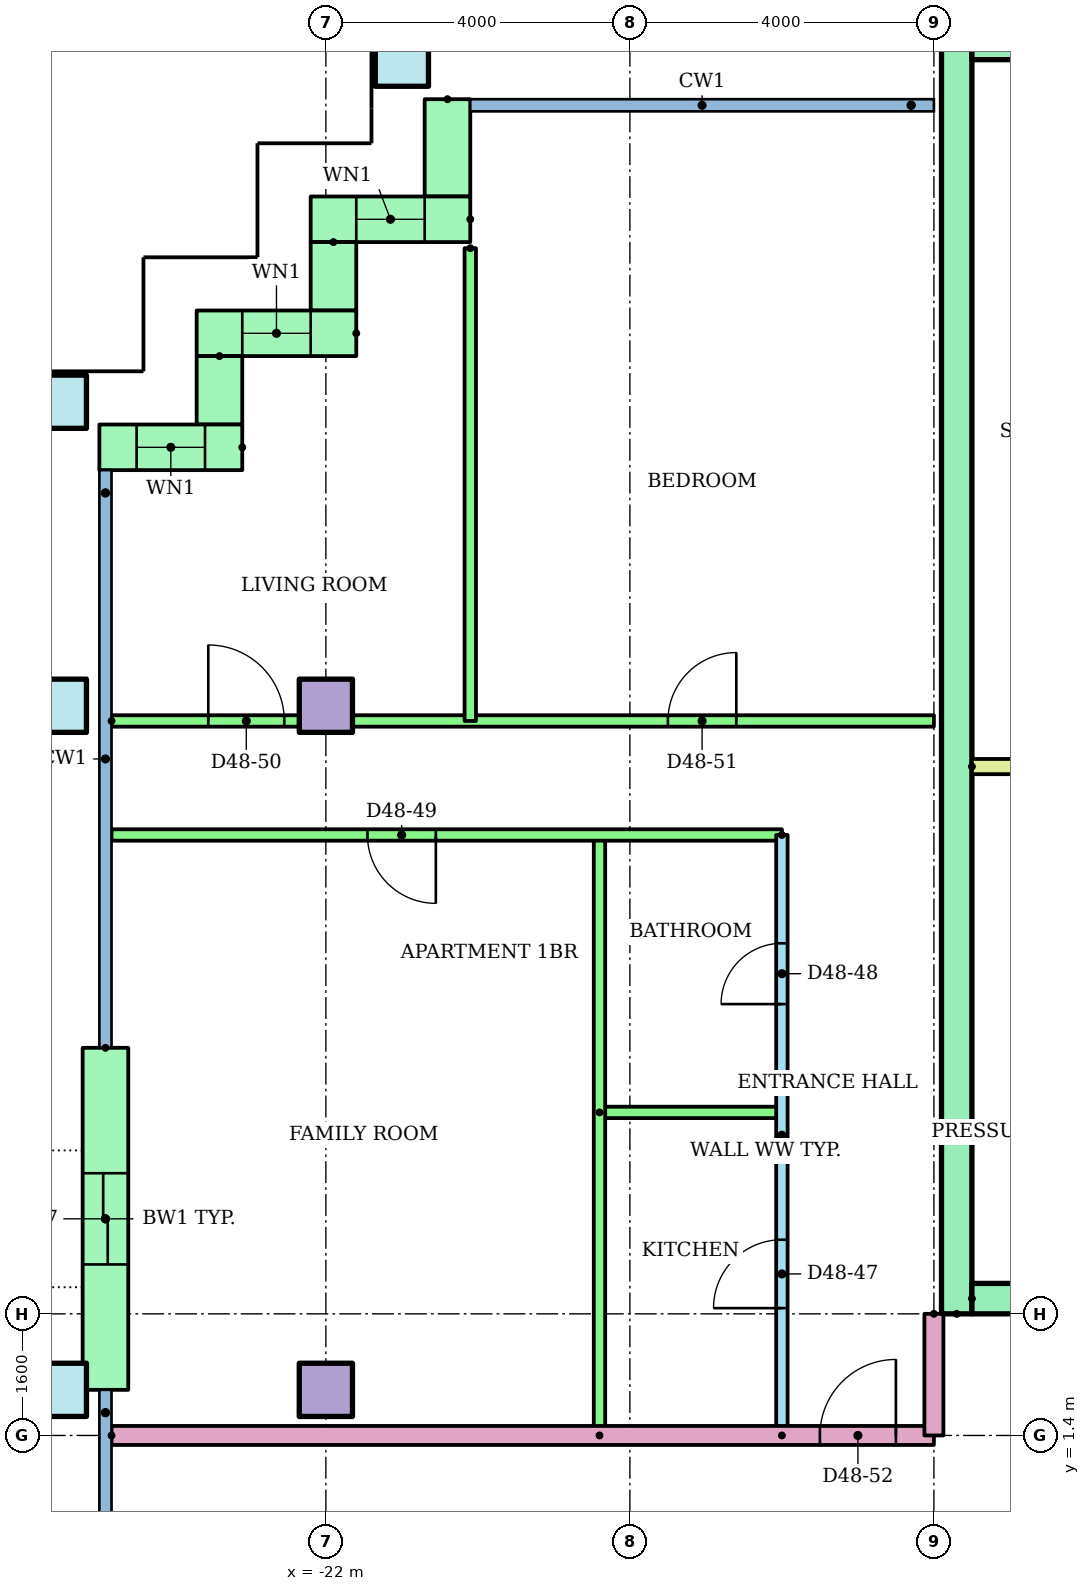
"""IFC4 building model, lengths in metres.
Left out: names, types, materials, properties, quantities, classifications, styles, units other than length and angle.
Written with IfcOpenShell. Run it as: python <this file> out.ifc"""

import sys

from ifc_helpers import new_model, si_unit, direction, frame, frame_2d, origin, origin_2d, place, context, subcontext, project, spatial, rectangle, hollow_rectangle, extrude, element, fill, save


model = new_model("IFC4")
c1 = context("Model", 3, precision=1e-05, world=origin(), true_north=direction((0.0, 1.0)))
c2 = subcontext(c1, "Body", "Model", "MODEL_VIEW")
j1 = project(units=[si_unit("LENGTHUNIT", "METRE"), si_unit("PLANEANGLEUNIT", "RADIAN")], contexts=[c1])
p1 = place(None, origin())
s1 = spatial("IfcSite", under=j1, at=p1, CompositionType="ELEMENT")
p2 = place(p1, origin())
s2 = spatial("IfcBuilding", under=s1, at=p2, CompositionType="ELEMENT")
p3 = place(p2, frame((0.0, 0.0, 184.5)))
s3 = spatial("IfcBuildingStorey", under=s2, at=p3, CompositionType="ELEMENT", Elevation=184.5)
p4 = place(p3, frame((-25.5, 2.0, 0.0)))
e1 = element("IfcColumn", 1, at=p4, inside=s3, PredefinedType="COLUMN", context=c2, shape_type="SweptSolid", body=[
    extrude(hollow_rectangle(XDim=0.7, YDim=0.7, WallThickness=0.036, at=origin_2d()), origin(), (0.0, 0.0, 1.0), 3.2),
])
p5 = place(p3, frame((-22.0, 2.0, 0.0)))
e2 = element("IfcColumn", 2, at=p5, inside=s3, PredefinedType="COLUMN", context=c2, shape_type="SweptSolid", body=[
    extrude(rectangle(XDim=0.7, YDim=0.7, at=origin_2d()), origin(), (0.0, 0.0, 1.0), 3.2),
])
p6 = place(p3, frame((-25.5, 11.0, 0.0)))
e3 = element("IfcColumn", 3, at=p6, inside=s3, PredefinedType="COLUMN", context=c2, shape_type="SweptSolid", body=[
    extrude(hollow_rectangle(XDim=0.7, YDim=0.7, WallThickness=0.036, at=origin_2d()), origin(), (0.0, 0.0, 1.0), 3.2),
])
p7 = place(p3, frame((-22.0, 11.0, 0.0)))
e4 = element("IfcColumn", 4, at=p7, inside=s3, PredefinedType="COLUMN", context=c2, shape_type="SweptSolid", body=[
    extrude(rectangle(XDim=0.7, YDim=0.7, at=origin_2d()), origin(), (0.0, 0.0, 1.0), 3.2),
])
for number, where in (
    (5, (-25.5, 15.0, 0.0)),
    (6, (-21.0, 19.5, 0.0)),
):
    element("IfcColumn", number, at=place(p3, frame(where)), inside=s3, PredefinedType="COLUMN", context=c2, shape_type="SweptSolid", body=[
        extrude(hollow_rectangle(XDim=0.7, YDim=0.7, WallThickness=0.036, at=origin_2d()), origin(), (0.0, 0.0, 1.0), 3.2),
    ])
p8 = place(p3, frame((-20.4, 18.98, 0.0), z_axis=(0.0, 0.0, 1.0), x_axis=(0.0, -1.0, 0.0)))
e7 = element("IfcWall", 7, at=p8, inside=s3, PredefinedType="STANDARD", context=c2, shape_type="SweptSolid", body=[
    extrude(rectangle(XDim=1.28, YDim=0.6, at=frame_2d((0.64, 0.0))), origin(), (0.0, 0.0, 1.0), 2.92),
])
p9 = place(p3, frame((-20.1, 17.4, 0.0), z_axis=(0.0, 0.0, 1.0), x_axis=(-1.0, 0.0, 0.0)))
e8 = element("IfcWall", 8, at=p9, inside=s3, PredefinedType="STANDARD", context=c2, shape_type="SweptSolid", body=[
    extrude(rectangle(XDim=2.1, YDim=0.6, at=frame_2d((1.05, 0.0))), origin(), (0.0, 0.0, 1.0), 2.92),
])
p10 = place(p9, frame((0.6, 0.0, 0.9)))
e9 = element("IfcOpeningElement", 9, at=p10, cuts=e8, PredefinedType="OPENING", context=c2, shape_type="SweptSolid", body=[
    extrude(rectangle(XDim=0.9, YDim=1.5, at=frame_2d((0.45, 0.75))), frame((0.0, 0.31, 0.0), z_axis=(0.0, -1.0, 0.0), x_axis=(1.0, 0.0, 0.0)), (0.0, 0.0, 1.0), 0.62),
])
p11 = place(p3, frame((-21.9, 17.1, 0.0), z_axis=(0.0, 0.0, 1.0), x_axis=(0.0, -1.0, 0.0)))
e10 = element("IfcWall", 10, at=p11, inside=s3, PredefinedType="STANDARD", context=c2, shape_type="SweptSolid", body=[
    extrude(rectangle(XDim=0.9, YDim=0.6, at=frame_2d((0.45, 0.0))), origin(), (0.0, 0.0, 1.0), 2.92),
])
p12 = place(p3, frame((-21.6, 15.9, 0.0), z_axis=(0.0, 0.0, 1.0), x_axis=(-1.0, 0.0, 0.0)))
e11 = element("IfcWall", 11, at=p12, inside=s3, PredefinedType="STANDARD", context=c2, shape_type="SweptSolid", body=[
    extrude(rectangle(XDim=2.1, YDim=0.6, at=frame_2d((1.05, 0.0))), origin(), (0.0, 0.0, 1.0), 2.92),
])
p13 = place(p12, frame((0.6, 0.0, 0.9)))
e12 = element("IfcOpeningElement", 12, at=p13, cuts=e11, PredefinedType="OPENING", context=c2, shape_type="SweptSolid", body=[
    extrude(rectangle(XDim=0.9, YDim=1.5, at=frame_2d((0.45, 0.75))), frame((0.0, 0.31, 0.0), z_axis=(0.0, -1.0, 0.0), x_axis=(1.0, 0.0, 0.0)), (0.0, 0.0, 1.0), 0.62),
])
p14 = place(p3, frame((-23.4, 15.6, 0.0), z_axis=(0.0, 0.0, 1.0), x_axis=(0.0, -1.0, 0.0)))
e13 = element("IfcWall", 13, at=p14, inside=s3, PredefinedType="STANDARD", context=c2, shape_type="SweptSolid", body=[
    extrude(rectangle(XDim=0.9, YDim=0.6, at=frame_2d((0.45, 0.0))), origin(), (0.0, 0.0, 1.0), 2.92),
])
p15 = place(p3, frame((-23.1, 14.4, 0.0), z_axis=(0.0, 0.0, 1.0), x_axis=(-1.0, 0.0, 0.0)))
e14 = element("IfcWall", 14, at=p15, inside=s3, PredefinedType="STANDARD", context=c2, shape_type="SweptSolid", body=[
    extrude(rectangle(XDim=1.88, YDim=0.6, at=frame_2d((0.94, 0.0))), origin(), (0.0, 0.0, 1.0), 2.92),
])
p16 = place(p15, frame((0.49, 0.0, 0.9)))
e15 = element("IfcOpeningElement", 15, at=p16, cuts=e14, PredefinedType="OPENING", context=c2, shape_type="SweptSolid", body=[
    extrude(rectangle(XDim=0.9, YDim=1.5, at=frame_2d((0.45, 0.75))), frame((0.0, 0.31, 0.0), z_axis=(0.0, -1.0, 0.0), x_axis=(1.0, 0.0, 0.0)), (0.0, 0.0, 1.0), 0.62),
])
p17 = place(p3, frame((-24.9, 6.5, 0.0), z_axis=(0.0, 0.0, 1.0), x_axis=(0.0, -1.0, 0.0)))
e16 = element("IfcWall", 16, at=p17, inside=s3, PredefinedType="STANDARD", context=c2, shape_type="SweptSolid", body=[
    extrude(rectangle(XDim=4.5, YDim=0.6, at=frame_2d((2.25, 0.0))), origin(), (0.0, 0.0, 1.0), 2.92),
])
p18 = place(p17, frame((1.65, 0.0, 0.0)))
e17 = element("IfcOpeningElement", 17, at=p18, cuts=e16, PredefinedType="OPENING", context=c2, shape_type="SweptSolid", body=[
    extrude(rectangle(XDim=1.2, YDim=2.1, at=frame_2d((0.6, 1.05))), frame((0.0, 0.31, 0.0), z_axis=(0.0, -1.0, 0.0), x_axis=(1.0, 0.0, 0.0)), (0.0, 0.0, 1.0), 0.62),
])
p19 = place(p3, frame((-13.7, 3.0, 0.0), z_axis=(0.0, 0.0, 1.0), x_axis=(0.0, 1.0, 0.0)))
e18 = element("IfcWall", 18, at=p19, inside=s3, PredefinedType="SHEAR", context=c2, shape_type="SweptSolid", body=[
    extrude(rectangle(XDim=17.0, YDim=0.4, at=frame_2d((8.5, 0.0))), origin(), (0.0, 0.0, 1.0), 2.92),
])
p20 = place(p3, frame((-13.5, 19.7, 0.0)))
e19 = element("IfcWall", 19, at=p20, inside=s3, PredefinedType="SHEAR", context=c2, shape_type="SweptSolid", body=[
    extrude(rectangle(XDim=27.0, YDim=0.4, at=frame_2d((13.5, 0.0))), origin(), (0.0, 0.0, 1.0), 2.92),
])
p21 = place(p3, frame((-13.5, 3.2, 0.0)))
e20 = element("IfcWall", 20, at=p21, inside=s3, PredefinedType="SHEAR", context=c2, shape_type="SweptSolid", body=[
    extrude(rectangle(XDim=27.0, YDim=0.4, at=frame_2d((13.5, 0.0))), origin(), (0.0, 0.0, 1.0), 2.92),
])
p22 = place(p21, frame((22.083, 0.0, 0.0)))
e21 = element("IfcOpeningElement", 21, at=p22, cuts=e20, PredefinedType="OPENING", context=c2, shape_type="SweptSolid", body=[
    extrude(rectangle(XDim=1.1, YDim=2.1, at=frame_2d((0.55, 1.05))), frame((0.0, 0.21, 0.0), z_axis=(0.0, -1.0, 0.0), x_axis=(1.0, 0.0, 0.0)), (0.0, 0.0, 1.0), 0.42),
])
p23 = place(p21, frame((25.128, 0.0, 0.0)))
e22 = element("IfcOpeningElement", 22, at=p23, cuts=e20, PredefinedType="OPENING", context=c2, shape_type="SweptSolid", body=[
    extrude(rectangle(XDim=1.1, YDim=2.1, at=frame_2d((0.55, 1.05))), frame((0.0, 0.21, 0.0), z_axis=(0.0, -1.0, 0.0), x_axis=(1.0, 0.0, 0.0)), (0.0, 0.0, 1.0), 0.42),
])
p24 = place(p21, frame((12.6, 0.0, 0.0)))
e23 = element("IfcOpeningElement", 23, at=p24, cuts=e20, PredefinedType="OPENING", context=c2, shape_type="SweptSolid", body=[
    extrude(rectangle(XDim=1.8, YDim=2.1, at=frame_2d((0.9, 1.05))), frame((0.0, 0.21, 0.0), z_axis=(0.0, -1.0, 0.0), x_axis=(1.0, 0.0, 0.0)), (0.0, 0.0, 1.0), 0.42),
])
p25 = place(p3, frame((-13.5, 10.2, 0.0)))
e24 = element("IfcWall", 24, at=p25, inside=s3, PredefinedType="PARTITIONING", context=c2, shape_type="SweptSolid", body=[
    extrude(rectangle(XDim=3.9, YDim=0.2, at=frame_2d((1.95, 0.0))), origin(), (0.0, 0.0, 1.0), 2.92),
])
p26 = place(p3, frame((-16.0, 1.4, 0.0), z_axis=(0.0, 0.0, 1.0), x_axis=(0.0, 1.0, 0.0)))
e25 = element("IfcWall", 25, at=p26, inside=s3, PredefinedType="PARTITIONING", context=c2, shape_type="SweptSolid", body=[
    extrude(rectangle(XDim=7.9, YDim=0.15, at=frame_2d((3.95, 0.0))), origin(), (0.0, 0.0, 1.0), 2.4),
])
p27 = place(p26, frame((1.675, 0.0, 0.0)))
e26 = element("IfcOpeningElement", 26, at=p27, cuts=e25, PredefinedType="OPENING", context=c2, shape_type="SweptSolid", body=[
    extrude(rectangle(XDim=0.9, YDim=2.1, at=frame_2d((0.45, 1.05))), frame((0.0, 0.085, 0.0), z_axis=(0.0, -1.0, 0.0), x_axis=(1.0, 0.0, 0.0)), (0.0, 0.0, 1.0), 0.17),
])
p28 = place(p26, frame((5.675, 0.0, 0.0)))
e27 = element("IfcOpeningElement", 27, at=p28, cuts=e25, PredefinedType="OPENING", context=c2, shape_type="SweptSolid", body=[
    extrude(rectangle(XDim=0.8, YDim=2.1, at=frame_2d((0.4, 1.05))), frame((0.0, 0.085, 0.0), z_axis=(0.0, -1.0, 0.0), x_axis=(1.0, 0.0, 0.0)), (0.0, 0.0, 1.0), 0.17),
])
p29 = place(p3, frame((-18.4, 5.65, 0.0)))
e28 = element("IfcWall", 28, at=p29, inside=s3, PredefinedType="PARTITIONING", context=c2, shape_type="SweptSolid", body=[
    extrude(rectangle(XDim=2.4, YDim=0.15, at=frame_2d((1.2, 0.0))), origin(), (0.0, 0.0, 1.0), 2.4),
])
p30 = place(p3, frame((-18.4, 1.4, 0.0), z_axis=(0.0, 0.0, 1.0), x_axis=(0.0, 1.0, 0.0)))
e29 = element("IfcWall", 29, at=p30, inside=s3, PredefinedType="PARTITIONING", context=c2, shape_type="SweptSolid", body=[
    extrude(rectangle(XDim=7.9, YDim=0.15, at=frame_2d((3.95, 0.0))), origin(), (0.0, 0.0, 1.0), 2.4),
])
p31 = place(p3, frame((-16.0, 9.3, 0.0), z_axis=(0.0, 0.0, 1.0), x_axis=(-1.0, 0.0, 0.0)))
e30 = element("IfcWall", 30, at=p31, inside=s3, PredefinedType="PARTITIONING", context=c2, shape_type="SweptSolid", body=[
    extrude(rectangle(XDim=8.82, YDim=0.15, at=frame_2d((4.41, 0.0))), origin(), (0.0, 0.0, 1.0), 2.4),
])
p32 = place(p31, frame((4.553, 0.0, 0.0)))
e31 = element("IfcOpeningElement", 31, at=p32, cuts=e30, PredefinedType="OPENING", context=c2, shape_type="SweptSolid", body=[
    extrude(rectangle(XDim=0.9, YDim=2.1, at=frame_2d((0.45, 1.05))), frame((0.0, 0.085, 0.0), z_axis=(0.0, -1.0, 0.0), x_axis=(1.0, 0.0, 0.0)), (0.0, 0.0, 1.0), 0.17),
])
p33 = place(p3, frame((-24.82, 10.8, 0.0)))
e32 = element("IfcWall", 32, at=p33, inside=s3, PredefinedType="PARTITIONING", context=c2, shape_type="SweptSolid", body=[
    extrude(rectangle(XDim=10.82, YDim=0.15, at=frame_2d((5.41, 0.0))), origin(), (0.0, 0.0, 1.0), 2.4),
])
p34 = place(p33, frame((1.273, 0.0, 0.0)))
e33 = element("IfcOpeningElement", 33, at=p34, cuts=e32, PredefinedType="OPENING", context=c2, shape_type="SweptSolid", body=[
    extrude(rectangle(XDim=1.0, YDim=2.1, at=frame_2d((0.5, 1.05))), frame((0.0, 0.085, 0.0), z_axis=(0.0, -1.0, 0.0), x_axis=(1.0, 0.0, 0.0)), (0.0, 0.0, 1.0), 0.17),
])
p35 = place(p33, frame((7.32, 0.0, 0.0)))
e34 = element("IfcOpeningElement", 34, at=p35, cuts=e32, PredefinedType="OPENING", context=c2, shape_type="SweptSolid", body=[
    extrude(rectangle(XDim=0.9, YDim=2.1, at=frame_2d((0.45, 1.05))), frame((0.0, 0.085, 0.0), z_axis=(0.0, -1.0, 0.0), x_axis=(1.0, 0.0, 0.0)), (0.0, 0.0, 1.0), 0.17),
])
p36 = place(p3, frame((-20.1, 17.02, 0.0), z_axis=(0.0, 0.0, 1.0), x_axis=(0.0, -1.0, 0.0)))
e35 = element("IfcWall", 35, at=p36, inside=s3, PredefinedType="PARTITIONING", context=c2, shape_type="SweptSolid", body=[
    extrude(rectangle(XDim=6.22, YDim=0.15, at=frame_2d((3.11, 0.0))), origin(), (0.0, 0.0, 1.0), 2.4),
])
p37 = place(p3, frame((-24.82, 1.4, 0.0)))
e36 = element("IfcWall", 36, at=p37, inside=s3, PredefinedType="PARTITIONING", context=c2, shape_type="SweptSolid", body=[
    extrude(rectangle(XDim=10.82, YDim=0.25, at=frame_2d((5.41, 0.0))), origin(), (0.0, 0.0, 1.0), 2.4),
])
p38 = place(p37, frame((9.32, 0.0, 0.0)))
e37 = element("IfcOpeningElement", 37, at=p38, cuts=e36, PredefinedType="OPENING", context=c2, shape_type="SweptSolid", body=[
    extrude(rectangle(XDim=1.0, YDim=2.1, at=frame_2d((0.5, 1.05))), frame((0.0, 0.135, 0.0), z_axis=(0.0, -1.0, 0.0), x_axis=(1.0, 0.0, 0.0)), (0.0, 0.0, 1.0), 0.27),
])
p39 = place(p3, frame((-14.0, 3.0, 0.0), z_axis=(0.0, 0.0, 1.0), x_axis=(0.0, -1.0, 0.0)))
e38 = element("IfcWall", 38, at=p39, inside=s3, PredefinedType="PARTITIONING", context=c2, shape_type="SweptSolid", body=[
    extrude(rectangle(XDim=1.6, YDim=0.25, at=frame_2d((0.8, 0.0))), origin(), (0.0, 0.0, 1.0), 2.4),
])
p40 = place(p10, origin())
e39 = element("IfcWindow", 39, at=p40, inside=s3, PartitioningType="SINGLE_PANEL", PredefinedType="WINDOW", context=c2, shape_type="SweptSolid", body=[
    extrude(rectangle(XDim=0.9, YDim=1.5, at=frame_2d((0.45, 0.75))), frame((0.0, 0.03, 0.0), z_axis=(0.0, -1.0, 0.0), x_axis=(1.0, 0.0, 0.0)), (0.0, 0.0, 1.0), 0.06),
])
fill(e9, e39)
p41 = place(p13, origin())
e40 = element("IfcWindow", 40, at=p41, inside=s3, PartitioningType="SINGLE_PANEL", PredefinedType="WINDOW", context=c2, shape_type="SweptSolid", body=[
    extrude(rectangle(XDim=0.9, YDim=1.5, at=frame_2d((0.45, 0.75))), frame((0.0, 0.03, 0.0), z_axis=(0.0, -1.0, 0.0), x_axis=(1.0, 0.0, 0.0)), (0.0, 0.0, 1.0), 0.06),
])
fill(e12, e40)
p42 = place(p16, origin())
e41 = element("IfcWindow", 41, at=p42, inside=s3, PartitioningType="SINGLE_PANEL", PredefinedType="WINDOW", context=c2, shape_type="SweptSolid", body=[
    extrude(rectangle(XDim=0.9, YDim=1.5, at=frame_2d((0.45, 0.75))), frame((0.0, 0.03, 0.0), z_axis=(0.0, -1.0, 0.0), x_axis=(1.0, 0.0, 0.0)), (0.0, 0.0, 1.0), 0.06),
])
fill(e15, e41)
p43 = place(p27, origin())
e42 = element("IfcDoor", 42, at=p43, inside=s3, OperationType="SINGLE_SWING_LEFT", PredefinedType="DOOR", context=c2, shape_type="SweptSolid", body=[
    extrude(rectangle(XDim=0.9, YDim=2.1, at=frame_2d((0.45, 1.05))), frame((0.0, 0.025, 0.0), z_axis=(0.0, -1.0, 0.0), x_axis=(1.0, 0.0, 0.0)), (0.0, 0.0, 1.0), 0.05),
])
fill(e26, e42)
p44 = place(p28, origin())
e43 = element("IfcDoor", 43, at=p44, inside=s3, OperationType="SINGLE_SWING_LEFT", PredefinedType="DOOR", context=c2, shape_type="SweptSolid", body=[
    extrude(rectangle(XDim=0.8, YDim=2.1, at=frame_2d((0.4, 1.05))), frame((0.0, 0.025, 0.0), z_axis=(0.0, -1.0, 0.0), x_axis=(1.0, 0.0, 0.0)), (0.0, 0.0, 1.0), 0.05),
])
fill(e27, e43)
p45 = place(p32, origin())
e44 = element("IfcDoor", 44, at=p45, inside=s3, OperationType="SINGLE_SWING_LEFT", PredefinedType="DOOR", context=c2, shape_type="SweptSolid", body=[
    extrude(rectangle(XDim=0.9, YDim=2.1, at=frame_2d((0.45, 1.05))), frame((0.0, 0.025, 0.0), z_axis=(0.0, -1.0, 0.0), x_axis=(1.0, 0.0, 0.0)), (0.0, 0.0, 1.0), 0.05),
])
fill(e31, e44)
p46 = place(p34, origin())
e45 = element("IfcDoor", 45, at=p46, inside=s3, OperationType="SINGLE_SWING_LEFT", PredefinedType="DOOR", context=c2, shape_type="SweptSolid", body=[
    extrude(rectangle(XDim=1.0, YDim=2.1, at=frame_2d((0.5, 1.05))), frame((0.0, 0.025, 0.0), z_axis=(0.0, -1.0, 0.0), x_axis=(1.0, 0.0, 0.0)), (0.0, 0.0, 1.0), 0.05),
])
fill(e33, e45)
p47 = place(p35, origin())
e46 = element("IfcDoor", 46, at=p47, inside=s3, OperationType="SINGLE_SWING_RIGHT", PredefinedType="DOOR", context=c2, shape_type="SweptSolid", body=[
    extrude(rectangle(XDim=0.9, YDim=2.1, at=frame_2d((0.45, 1.05))), frame((0.0, 0.025, 0.0), z_axis=(0.0, -1.0, 0.0), x_axis=(1.0, 0.0, 0.0)), (0.0, 0.0, 1.0), 0.05),
])
fill(e34, e46)
p48 = place(p38, origin())
e47 = element("IfcDoor", 47, at=p48, inside=s3, OperationType="SINGLE_SWING_RIGHT", PredefinedType="DOOR", context=c2, shape_type="SweptSolid", body=[
    extrude(rectangle(XDim=1.0, YDim=2.1, at=frame_2d((0.5, 1.05))), frame((0.0, 0.025, 0.0), z_axis=(0.0, -1.0, 0.0), x_axis=(1.0, 0.0, 0.0)), (0.0, 0.0, 1.0), 0.05),
])
fill(e37, e47)
p49 = place(p18, origin())
e48 = element("IfcDoor", 48, at=p49, inside=s3, OperationType="SLIDING_TO_LEFT", PredefinedType="DOOR", context=c2, shape_type="SweptSolid", body=[
    extrude(rectangle(XDim=1.2, YDim=2.1, at=frame_2d((0.6, 1.05))), frame((0.0, 0.025, 0.0), z_axis=(0.0, -1.0, 0.0), x_axis=(1.0, 0.0, 0.0)), (0.0, 0.0, 1.0), 0.05),
])
fill(e17, e48)
save(model, sys.argv[1])
